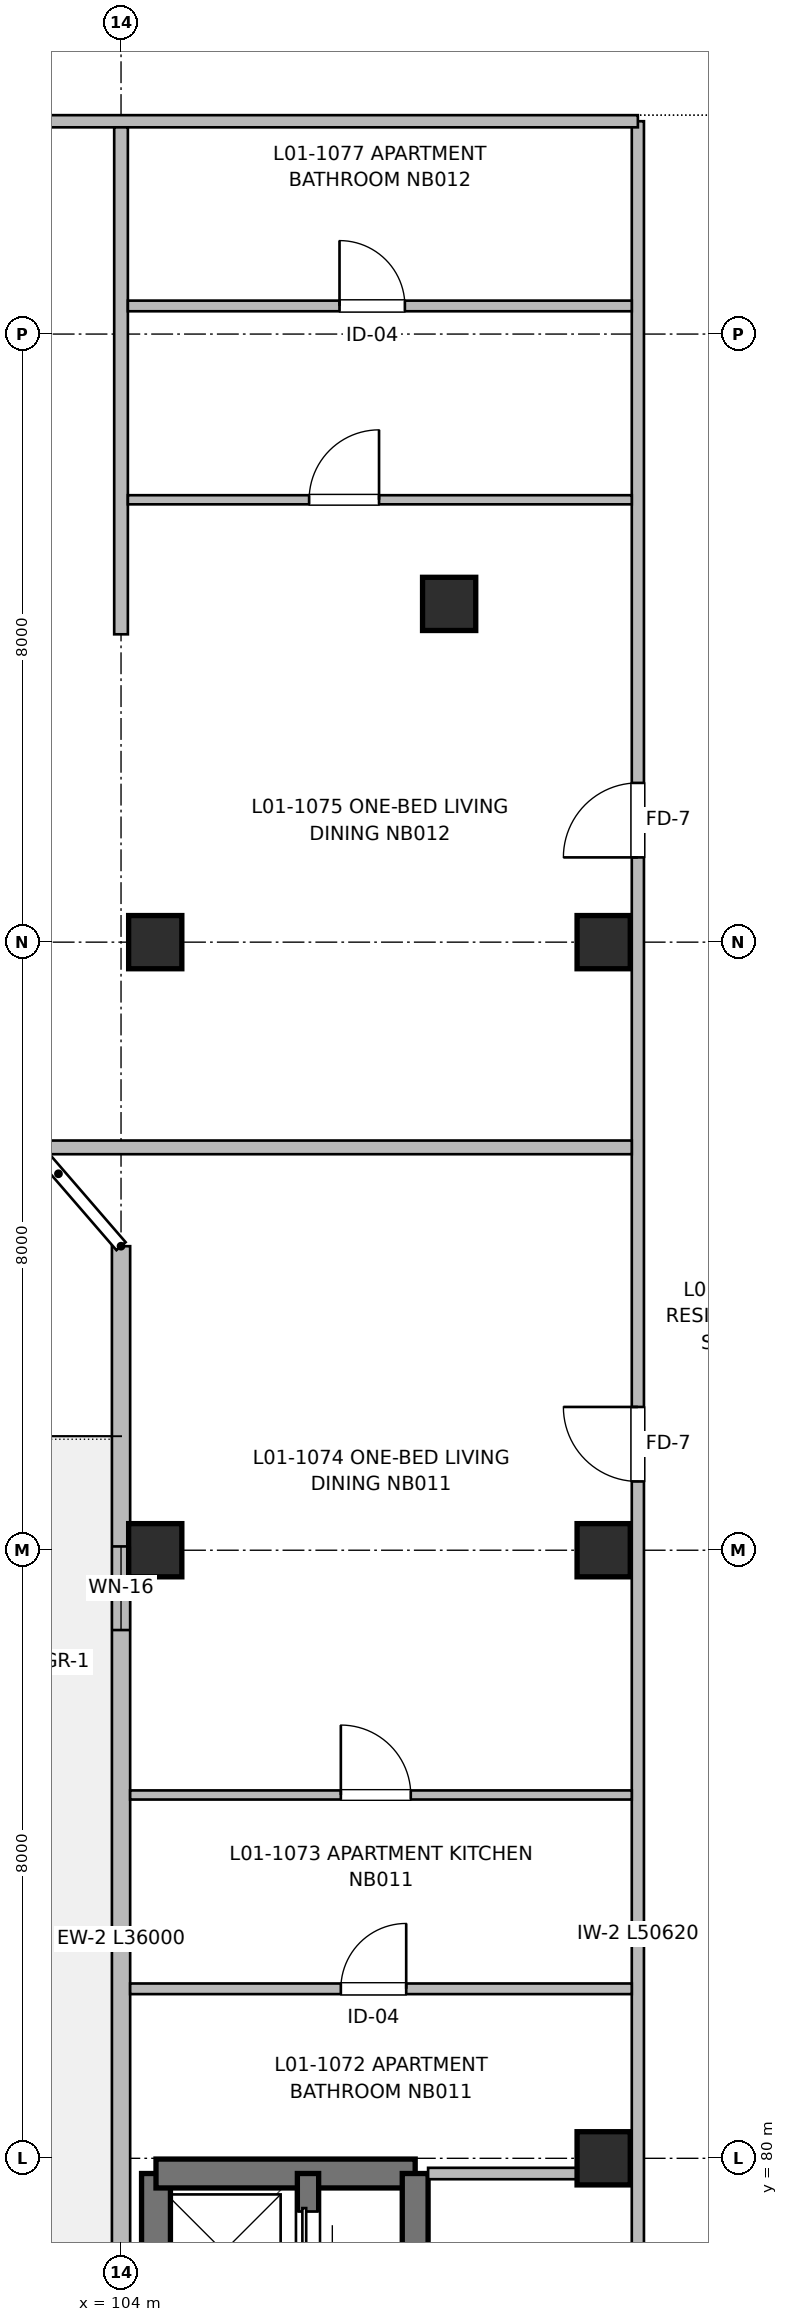
"""IFC4 building model, lengths in metres.
Left out: names, types, materials, properties, quantities, classifications, styles, units other than length and angle.
Written with IfcOpenShell. Run it as: python <this file> out.ifc"""

import sys

from ifc_helpers import new_model, si_unit, direction, frame, frame_2d, origin, origin_2d, place, context, subcontext, project, spatial, rectangle, extrude, element, fill, save


model = new_model("IFC4")
c1 = context("Model", 3, precision=1e-05, world=origin(), true_north=direction((0.0, 1.0)))
c2 = subcontext(c1, "Body", "Model", "MODEL_VIEW")
j1 = project(units=[si_unit("LENGTHUNIT", "METRE"), si_unit("PLANEANGLEUNIT", "RADIAN")], contexts=[c1])
p1 = place(None, origin())
s1 = spatial("IfcSite", under=j1, at=p1, CompositionType="ELEMENT")
p2 = place(p1, origin())
s2 = spatial("IfcBuilding", under=s1, at=p2, CompositionType="ELEMENT")
p3 = place(p2, frame((0.0, 0.0, 4.16)))
s3 = spatial("IfcBuildingStorey", under=s2, at=p3, CompositionType="ELEMENT", Elevation=4.16)
for number, where, z_axis, x_axis in (
    (1, (104.45, 88.0, 0.0), (0.0, 0.0, 1.0), (1.0, 0.0, 0.0)),
    (2, (104.45, 96.0, 0.0), (0.0, 0.0, 1.0), (1.0, 0.0, 0.0)),
    (3, (108.317, 100.45, 0.0), (0.0, 0.0, 1.0), (1.0, 0.0, 0.0)),
    (4, (110.35, 80.0, 0.0), (0.0, 0.0, 1.0), (1.0, 0.0, 0.0)),
    (5, (110.35, 88.0, 0.0), (0.0, 0.0, 1.0), (1.0, 0.0, 0.0)),
    (6, (110.35, 96.0, 0.0), (0.0, 0.0, 1.0), (1.0, 0.0, 0.0)),
):
    element("IfcColumn", number, at=place(p3, frame(where, z_axis=z_axis, x_axis=x_axis)), inside=s3, PredefinedType="COLUMN", context=c2, shape_type="SweptSolid", body=[
        extrude(rectangle(XDim=0.7, YDim=0.7, at=origin_2d()), origin(), (0.0, 0.0, 1.0), 3.2),
    ])
p4 = place(p3, frame((104.46, 67.35, 0.0), z_axis=(0.0, 0.0, 1.0), x_axis=(0.0, 1.0, 0.0)))
e7 = element("IfcWall", 7, at=p4, inside=s3, PredefinedType="SHEAR", context=c2, shape_type="SweptSolid", body=[
    extrude(rectangle(XDim=12.45, YDim=0.38, at=frame_2d((6.225, 0.0))), origin(), (0.0, 0.0, 1.0), 3.2),
])
p5 = place(p4, frame((2.2, 0.0, 0.97)))
e8 = element("IfcOpeningElement", 8, at=p5, cuts=e7, PredefinedType="OPENING", context=c2, shape_type="SweptSolid", body=[
    extrude(rectangle(XDim=0.95, YDim=1.25, at=frame_2d((0.475, 0.625))), frame((0.0, 0.2, 0.0), z_axis=(0.0, -1.0, 0.0), x_axis=(1.0, 0.0, 0.0)), (0.0, 0.0, 1.0), 0.4),
])
p6 = place(p3, frame((104.46, 79.8, 0.0), z_axis=(0.0, 0.0, 1.0), x_axis=(1.0, 0.0, 0.0)))
e9 = element("IfcWall", 9, at=p6, inside=s3, PredefinedType="SHEAR", context=c2, shape_type="SweptSolid", body=[
    extrude(rectangle(XDim=3.41, YDim=0.38, at=frame_2d((1.705, 0.0))), origin(), (0.0, 0.0, 1.0), 3.2),
])
p7 = place(p3, frame((107.87, 79.8, 0.0), z_axis=(0.0, 0.0, 1.0), x_axis=(0.0, -1.0, 0.0)))
e10 = element("IfcWall", 10, at=p7, inside=s3, PredefinedType="SHEAR", context=c2, shape_type="SweptSolid", body=[
    extrude(rectangle(XDim=12.45, YDim=0.34, at=frame_2d((6.225, 0.0))), origin(), (0.0, 0.0, 1.0), 3.2),
])
p8 = place(p7, frame((10.85, 0.0, 0.0)))
e11 = element("IfcOpeningElement", 11, at=p8, cuts=e10, PredefinedType="OPENING", context=c2, shape_type="SweptSolid", body=[
    extrude(rectangle(XDim=1.05, YDim=2.15, at=frame_2d((0.525, 1.075))), frame((0.0, 0.18, 0.0), z_axis=(0.0, -1.0, 0.0), x_axis=(1.0, 0.0, 0.0)), (0.0, 0.0, 1.0), 0.36),
])
p9 = place(p3, frame((106.46, 74.55, 0.0), z_axis=(0.0, 0.0, 1.0), x_axis=(0.0, 1.0, 0.0)))
e12 = element("IfcWall", 12, at=p9, inside=s3, PredefinedType="SHEAR", context=c2, shape_type="SweptSolid", body=[
    extrude(rectangle(XDim=5.25, YDim=0.28, at=frame_2d((2.625, 0.0))), origin(), (0.0, 0.0, 1.0), 3.2),
])
p10 = place(p9, frame((1.15, 0.0, 0.0)))
e13 = element("IfcOpeningElement", 13, at=p10, cuts=e12, PredefinedType="OPENING", context=c2, shape_type="SweptSolid", body=[
    extrude(rectangle(XDim=1.0, YDim=2.15, at=frame_2d((0.5, 1.075))), frame((0.0, 0.15, 0.0), z_axis=(0.0, -1.0, 0.0), x_axis=(1.0, 0.0, 0.0)), (0.0, 0.0, 1.0), 0.3),
])
p11 = place(p9, frame((3.85, 0.0, 0.0)))
e14 = element("IfcOpeningElement", 14, at=p11, cuts=e12, PredefinedType="OPENING", context=c2, shape_type="SweptSolid", body=[
    extrude(rectangle(XDim=0.9, YDim=2.15, at=frame_2d((0.45, 1.075))), frame((0.0, 0.15, 0.0), z_axis=(0.0, -1.0, 0.0), x_axis=(1.0, 0.0, 0.0)), (0.0, 0.0, 1.0), 0.3),
])
p12 = place(p3, frame((104.0, 56.0, 0.0), z_axis=(0.0, 0.0, 1.0), x_axis=(0.0, 1.0, 0.0)))
e15 = element("IfcWall", 15, at=p12, inside=s3, PredefinedType="SOLIDWALL", context=c2, shape_type="SweptSolid", body=[
    extrude(rectangle(XDim=36.0, YDim=0.24, at=frame_2d((18.0, 0.0))), origin(), (0.0, 0.0, 1.0), 2.98),
])
p13 = place(p12, frame((3.9, 0.0, 0.0)))
e16 = element("IfcOpeningElement", 16, at=p13, cuts=e15, PredefinedType="OPENING", context=c2, shape_type="SweptSolid", body=[
    extrude(rectangle(XDim=1.2, YDim=2.2, at=frame_2d((0.6, 1.1))), frame((0.0, 0.13, 0.0), z_axis=(0.0, -1.0, 0.0), x_axis=(1.0, 0.0, 0.0)), (0.0, 0.0, 1.0), 0.26),
])
p14 = place(p12, frame((5.8, 0.0, 0.72)))
e17 = element("IfcOpeningElement", 17, at=p14, cuts=e15, PredefinedType="OPENING", context=c2, shape_type="SweptSolid", body=[
    extrude(rectangle(XDim=1.7, YDim=1.5, at=frame_2d((0.85, 0.75))), frame((0.0, 0.13, 0.0), z_axis=(0.0, -1.0, 0.0), x_axis=(1.0, 0.0, 0.0)), (0.0, 0.0, 1.0), 0.26),
])
p15 = place(p12, frame((12.9, 0.0, 0.9)))
e18 = element("IfcOpeningElement", 18, at=p15, cuts=e15, PredefinedType="OPENING", context=c2, shape_type="SweptSolid", body=[
    extrude(rectangle(XDim=1.2, YDim=1.05, at=frame_2d((0.6, 0.525))), frame((0.0, 0.13, 0.0), z_axis=(0.0, -1.0, 0.0), x_axis=(1.0, 0.0, 0.0)), (0.0, 0.0, 1.0), 0.26),
])
p16 = place(p12, frame((22.175, 0.0, 0.9)))
e19 = element("IfcOpeningElement", 19, at=p16, cuts=e15, PredefinedType="OPENING", context=c2, shape_type="SweptSolid", body=[
    extrude(rectangle(XDim=0.65, YDim=0.95, at=frame_2d((0.325, 0.475))), frame((0.0, 0.13, 0.0), z_axis=(0.0, -1.0, 0.0), x_axis=(1.0, 0.0, 0.0)), (0.0, 0.0, 1.0), 0.26),
])
p17 = place(p12, frame((30.95, 0.0, 0.62)))
e20 = element("IfcOpeningElement", 20, at=p17, cuts=e15, PredefinedType="OPENING", context=c2, shape_type="SweptSolid", body=[
    extrude(rectangle(XDim=1.1, YDim=1.6, at=frame_2d((0.55, 0.8))), frame((0.0, 0.13, 0.0), z_axis=(0.0, -1.0, 0.0), x_axis=(1.0, 0.0, 0.0)), (0.0, 0.0, 1.0), 0.26),
])
p18 = place(p3, frame((108.04, 79.8, 0.0), z_axis=(0.0, 0.0, 1.0), x_axis=(1.0, 0.0, 0.0)))
e21 = element("IfcWall", 21, at=p18, inside=s3, PredefinedType="PARTITIONING", context=c2, shape_type="SweptSolid", body=[
    extrude(rectangle(XDim=2.68, YDim=0.15, at=frame_2d((1.34, 0.0))), origin(), (0.0, 0.0, 1.0), 2.935),
])
p19 = place(p3, frame((110.8, 56.18, 0.0), z_axis=(0.0, 0.0, 1.0), x_axis=(0.0, 1.0, 0.0)))
e22 = element("IfcWall", 22, at=p19, inside=s3, PredefinedType="PARTITIONING", context=c2, shape_type="SweptSolid", body=[
    extrude(rectangle(XDim=50.62, YDim=0.16, at=frame_2d((25.31, 0.0))), origin(), (0.0, 0.0, 1.0), 2.935),
])
p20 = place(p19, frame((12.82, 0.0, 0.0)))
e23 = element("IfcOpeningElement", 23, at=p20, cuts=e22, PredefinedType="OPENING", context=c2, shape_type="SweptSolid", body=[
    extrude(rectangle(XDim=1.1, YDim=2.15, at=frame_2d((0.55, 1.075))), frame((0.0, 0.09, 0.0), z_axis=(0.0, -1.0, 0.0), x_axis=(1.0, 0.0, 0.0)), (0.0, 0.0, 1.0), 0.18),
])
p21 = place(p19, frame((19.22, 0.0, 0.0)))
e24 = element("IfcOpeningElement", 24, at=p21, cuts=e22, PredefinedType="OPENING", context=c2, shape_type="SweptSolid", body=[
    extrude(rectangle(XDim=1.6, YDim=2.15, at=frame_2d((0.8, 1.075))), frame((0.0, 0.09, 0.0), z_axis=(0.0, -1.0, 0.0), x_axis=(1.0, 0.0, 0.0)), (0.0, 0.0, 1.0), 0.18),
])
p22 = place(p19, frame((1.8, 0.0, 0.0)))
e25 = element("IfcOpeningElement", 25, at=p22, cuts=e22, PredefinedType="OPENING", context=c2, shape_type="SweptSolid", body=[
    extrude(rectangle(XDim=0.96, YDim=2.15, at=frame_2d((0.48, 1.075))), frame((0.0, 0.09, 0.0), z_axis=(0.0, -1.0, 0.0), x_axis=(1.0, 0.0, 0.0)), (0.0, 0.0, 1.0), 0.18),
])
p23 = place(p19, frame((32.725, 0.0, 0.0)))
e26 = element("IfcOpeningElement", 26, at=p23, cuts=e22, PredefinedType="OPENING", context=c2, shape_type="SweptSolid", body=[
    extrude(rectangle(XDim=0.98, YDim=2.15, at=frame_2d((0.49, 1.075))), frame((0.0, 0.09, 0.0), z_axis=(0.0, -1.0, 0.0), x_axis=(1.0, 0.0, 0.0)), (0.0, 0.0, 1.0), 0.18),
])
p24 = place(p19, frame((40.935, 0.0, 0.0)))
e27 = element("IfcOpeningElement", 27, at=p24, cuts=e22, PredefinedType="OPENING", context=c2, shape_type="SweptSolid", body=[
    extrude(rectangle(XDim=0.98, YDim=2.15, at=frame_2d((0.49, 1.075))), frame((0.0, 0.09, 0.0), z_axis=(0.0, -1.0, 0.0), x_axis=(1.0, 0.0, 0.0)), (0.0, 0.0, 1.0), 0.18),
])
p25 = place(p3, frame((93.68, 106.8, 0.0), z_axis=(0.0, 0.0, 1.0), x_axis=(1.0, 0.0, 0.0)))
e28 = element("IfcWall", 28, at=p25, inside=s3, PredefinedType="PARTITIONING", context=c2, shape_type="SweptSolid", body=[
    extrude(rectangle(XDim=17.12, YDim=0.16, at=frame_2d((8.56, 0.0))), origin(), (0.0, 0.0, 1.0), 2.935),
])
p26 = place(p3, frame((104.0, 100.05, 0.0), z_axis=(0.0, 0.0, 1.0), x_axis=(0.0, 1.0, 0.0)))
e29 = element("IfcWall", 29, at=p26, inside=s3, PredefinedType="PARTITIONING", context=c2, shape_type="SweptSolid", body=[
    extrude(rectangle(XDim=6.67, YDim=0.18, at=frame_2d((3.335, 0.0))), origin(), (0.0, 0.0, 1.0), 2.935),
])
p27 = place(p3, frame((102.929, 93.3, 0.0), z_axis=(0.0, 0.0, 1.0), x_axis=(1.0, 0.0, 0.0)))
e30 = element("IfcWall", 30, at=p27, inside=s3, PredefinedType="PARTITIONING", context=c2, shape_type="SweptSolid", body=[
    extrude(rectangle(XDim=7.791, YDim=0.18, at=frame_2d((3.895, 0.0))), origin(), (0.0, 0.0, 1.0), 2.935),
])
p28 = place(p3, frame((104.12, 82.23, 0.0), z_axis=(0.0, 0.0, 1.0), x_axis=(1.0, 0.0, 0.0)))
e31 = element("IfcWall", 31, at=p28, inside=s3, PredefinedType="PARTITIONING", context=c2, shape_type="SweptSolid", body=[
    extrude(rectangle(XDim=6.6, YDim=0.14, at=frame_2d((3.3, 0.0))), origin(), (0.0, 0.0, 1.0), 2.935),
])
p29 = place(p28, frame((2.772, 0.0, 0.0)))
e32 = element("IfcOpeningElement", 32, at=p29, cuts=e31, PredefinedType="OPENING", context=c2, shape_type="SweptSolid", body=[
    extrude(rectangle(XDim=0.86, YDim=2.1, at=frame_2d((0.43, 1.05))), frame((0.0, 0.08, 0.0), z_axis=(0.0, -1.0, 0.0), x_axis=(1.0, 0.0, 0.0)), (0.0, 0.0, 1.0), 0.16),
])
p30 = place(p3, frame((104.12, 84.78, 0.0), z_axis=(0.0, 0.0, 1.0), x_axis=(1.0, 0.0, 0.0)))
e33 = element("IfcWall", 33, at=p30, inside=s3, PredefinedType="PARTITIONING", context=c2, shape_type="SweptSolid", body=[
    extrude(rectangle(XDim=6.6, YDim=0.12, at=frame_2d((3.3, 0.0))), origin(), (0.0, 0.0, 1.0), 2.935),
])
p31 = place(p30, frame((2.772, 0.0, 0.0)))
e34 = element("IfcOpeningElement", 34, at=p31, cuts=e33, PredefinedType="OPENING", context=c2, shape_type="SweptSolid", body=[
    extrude(rectangle(XDim=0.92, YDim=2.1, at=frame_2d((0.46, 1.05))), frame((0.0, 0.07, 0.0), z_axis=(0.0, -1.0, 0.0), x_axis=(1.0, 0.0, 0.0)), (0.0, 0.0, 1.0), 0.14),
])
p32 = place(p3, frame((104.09, 101.82, 0.0), z_axis=(0.0, 0.0, 1.0), x_axis=(1.0, 0.0, 0.0)))
e35 = element("IfcWall", 35, at=p32, inside=s3, PredefinedType="PARTITIONING", context=c2, shape_type="SweptSolid", body=[
    extrude(rectangle(XDim=6.63, YDim=0.12, at=frame_2d((3.315, 0.0))), origin(), (0.0, 0.0, 1.0), 2.935),
])
p33 = place(p32, frame((2.385, 0.0, 0.0)))
e36 = element("IfcOpeningElement", 36, at=p33, cuts=e35, PredefinedType="OPENING", context=c2, shape_type="SweptSolid", body=[
    extrude(rectangle(XDim=0.92, YDim=2.1, at=frame_2d((0.46, 1.05))), frame((0.0, 0.07, 0.0), z_axis=(0.0, -1.0, 0.0), x_axis=(1.0, 0.0, 0.0)), (0.0, 0.0, 1.0), 0.14),
])
p34 = place(p3, frame((104.09, 104.37, 0.0), z_axis=(0.0, 0.0, 1.0), x_axis=(1.0, 0.0, 0.0)))
e37 = element("IfcWall", 37, at=p34, inside=s3, PredefinedType="PARTITIONING", context=c2, shape_type="SweptSolid", body=[
    extrude(rectangle(XDim=6.63, YDim=0.14, at=frame_2d((3.315, 0.0))), origin(), (0.0, 0.0, 1.0), 2.935),
])
p35 = place(p34, frame((2.785, 0.0, 0.0)))
e38 = element("IfcOpeningElement", 38, at=p35, cuts=e37, PredefinedType="OPENING", context=c2, shape_type="SweptSolid", body=[
    extrude(rectangle(XDim=0.86, YDim=2.1, at=frame_2d((0.43, 1.05))), frame((0.0, 0.08, 0.0), z_axis=(0.0, -1.0, 0.0), x_axis=(1.0, 0.0, 0.0)), (0.0, 0.0, 1.0), 0.16),
])
p36 = place(p11, origin())
e39 = element("IfcDoor", 39, at=p36, inside=s3, OperationType="SLIDING_TO_RIGHT", PredefinedType="DOOR", context=c2, shape_type="SweptSolid", body=[
    extrude(rectangle(XDim=0.9, YDim=2.15, at=frame_2d((0.45, 1.075))), frame((0.0, 0.025, 0.0), z_axis=(0.0, -1.0, 0.0), x_axis=(1.0, 0.0, 0.0)), (0.0, 0.0, 1.0), 0.05),
])
fill(e14, e39)
p37 = place(p17, origin())
e40 = element("IfcWindow", 40, at=p37, inside=s3, PartitioningType="SINGLE_PANEL", PredefinedType="WINDOW", context=c2, shape_type="SweptSolid", body=[
    extrude(rectangle(XDim=1.1, YDim=1.6, at=frame_2d((0.55, 0.8))), frame((0.0, 0.03, 0.0), z_axis=(0.0, -1.0, 0.0), x_axis=(1.0, 0.0, 0.0)), (0.0, 0.0, 1.0), 0.06),
])
fill(e20, e40)
p38 = place(p29, origin())
e41 = element("IfcDoor", 41, at=p38, inside=s3, OperationType="SINGLE_SWING_RIGHT", PredefinedType="DOOR", context=c2, shape_type="SweptSolid", body=[
    extrude(rectangle(XDim=0.86, YDim=2.1, at=frame_2d((0.43, 1.05))), frame((0.0, 0.025, 0.0), z_axis=(0.0, -1.0, 0.0), x_axis=(1.0, 0.0, 0.0)), (0.0, 0.0, 1.0), 0.05),
])
fill(e32, e41)
p39 = place(p31, origin())
e42 = element("IfcDoor", 42, at=p39, inside=s3, OperationType="SINGLE_SWING_LEFT", PredefinedType="DOOR", context=c2, shape_type="SweptSolid", body=[
    extrude(rectangle(XDim=0.92, YDim=2.1, at=frame_2d((0.46, 1.05))), frame((0.0, 0.025, 0.0), z_axis=(0.0, -1.0, 0.0), x_axis=(1.0, 0.0, 0.0)), (0.0, 0.0, 1.0), 0.05),
])
fill(e34, e42)
p40 = place(p23, origin())
e43 = element("IfcDoor", 43, at=p40, inside=s3, OperationType="SINGLE_SWING_RIGHT", PredefinedType="DOOR", context=c2, shape_type="SweptSolid", body=[
    extrude(rectangle(XDim=0.98, YDim=2.15, at=frame_2d((0.49, 1.075))), frame((0.0, 0.025, 0.0), z_axis=(0.0, -1.0, 0.0), x_axis=(1.0, 0.0, 0.0)), (0.0, 0.0, 1.0), 0.05),
])
fill(e26, e43)
p41 = place(p35, origin())
e44 = element("IfcDoor", 44, at=p41, inside=s3, OperationType="SINGLE_SWING_LEFT", PredefinedType="DOOR", context=c2, shape_type="SweptSolid", body=[
    extrude(rectangle(XDim=0.86, YDim=2.1, at=frame_2d((0.43, 1.05))), frame((0.0, 0.025, 0.0), z_axis=(0.0, -1.0, 0.0), x_axis=(1.0, 0.0, 0.0)), (0.0, 0.0, 1.0), 0.05),
])
fill(e38, e44)
p42 = place(p33, origin())
e45 = element("IfcDoor", 45, at=p42, inside=s3, OperationType="SINGLE_SWING_RIGHT", PredefinedType="DOOR", context=c2, shape_type="SweptSolid", body=[
    extrude(rectangle(XDim=0.92, YDim=2.1, at=frame_2d((0.46, 1.05))), frame((0.0, 0.025, 0.0), z_axis=(0.0, -1.0, 0.0), x_axis=(1.0, 0.0, 0.0)), (0.0, 0.0, 1.0), 0.05),
])
fill(e36, e45)
p43 = place(p24, origin())
e46 = element("IfcDoor", 46, at=p43, inside=s3, OperationType="SINGLE_SWING_LEFT", PredefinedType="DOOR", context=c2, shape_type="SweptSolid", body=[
    extrude(rectangle(XDim=0.98, YDim=2.15, at=frame_2d((0.49, 1.075))), frame((0.0, 0.025, 0.0), z_axis=(0.0, -1.0, 0.0), x_axis=(1.0, 0.0, 0.0)), (0.0, 0.0, 1.0), 0.05),
])
fill(e27, e46)
save(model, sys.argv[1])
